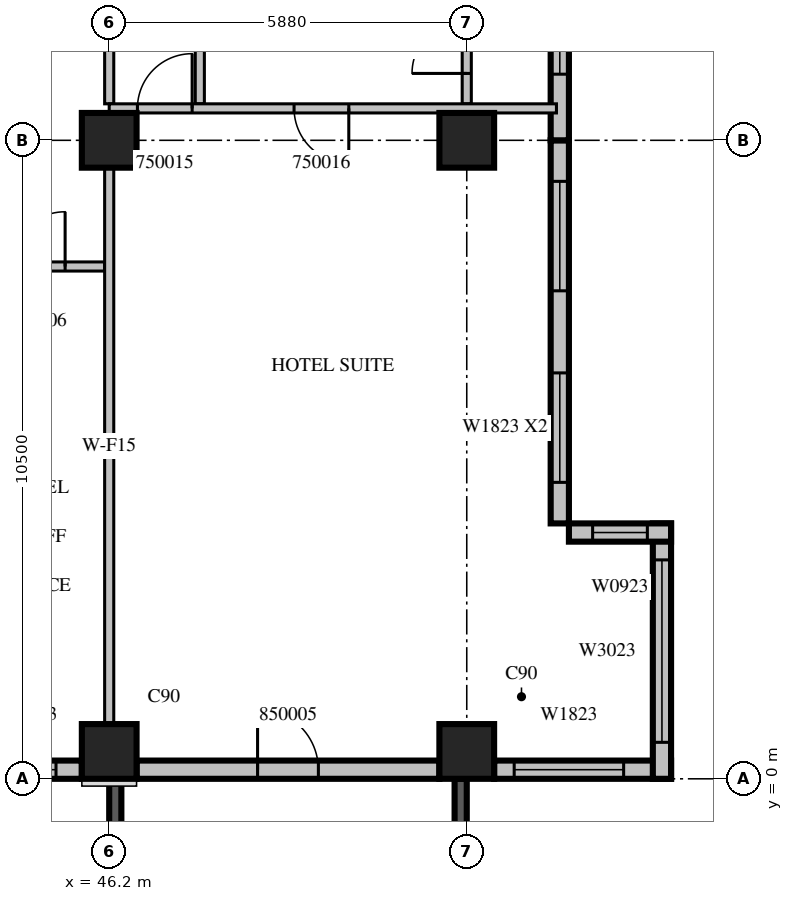
"""IFC4 building model, lengths in metres.
Left out: names, types, materials, properties, quantities, classifications, styles, units other than length and angle.
Written with IfcOpenShell. Run it as: python <this file> out.ifc"""

import sys

from ifc_helpers import new_model, si_unit, direction, frame, frame_2d, origin, origin_2d, place, context, subcontext, project, spatial, rectangle, extrude, source, transform, mapped, element, fill, save


model = new_model("IFC4")
c1 = context("Model", 3, precision=1e-05, world=origin(), true_north=direction((0.0, 1.0)))
c2 = subcontext(c1, "Body", "Model", "MODEL_VIEW")
j1 = project(units=[si_unit("LENGTHUNIT", "METRE"), si_unit("PLANEANGLEUNIT", "RADIAN")], contexts=[c1])
p1 = place(None, origin())
s1 = spatial("IfcSite", under=j1, at=p1, CompositionType="ELEMENT")
p2 = place(p1, origin())
s2 = spatial("IfcBuilding", under=s1, at=p2, CompositionType="ELEMENT")
p3 = place(p2, frame((0.0, 0.0, 223.4)))
s3 = spatial("IfcBuildingStorey", under=s2, at=p3, CompositionType="ELEMENT", Elevation=223.4)
m1 = source(origin(), c2, "Body", "SweptSolid", [
    extrude(rectangle(XDim=0.9, YDim=0.9, at=origin_2d()), origin(), (0.0, 0.0, 1.0), 3.8),
])
for number, where, z_axis, x_axis in (
    (1, (46.2, 0.45, 0.0), (0.0, 0.0, 1.0), (1.0, 0.0, 0.0)),
    (2, (52.08, 0.45, 0.0), (0.0, 0.0, 1.0), (1.0, 0.0, 0.0)),
    (3, (46.2, 10.5, 0.0), (0.0, 0.0, 1.0), (1.0, 0.0, 0.0)),
    (4, (52.08, 10.5, 0.0), (0.0, 0.0, 1.0), (1.0, 0.0, 0.0)),
):
    element("IfcColumn", number, at=place(p3, frame(where, z_axis=z_axis, x_axis=x_axis)), inside=s3, PredefinedType="COLUMN", context=c2, shape_type="MappedRepresentation", body=[
        mapped(m1, transform((0.0, 0.0, 0.0), scale=1.0)),
    ])
m2 = source(origin(), c2, "Body", "SweptSolid", [
    extrude(rectangle(XDim=1.75, YDim=0.3, at=frame_2d((0.875, 0.0))), origin(), (0.0, 0.0, 1.0), 3.4),
])
p4 = place(p3, frame((44.0, 0.15, 0.0), z_axis=(0.0, 0.0, 1.0), x_axis=(1.0, 0.0, 0.0)))
e5 = element("IfcWall", 5, at=p4, inside=s3, PredefinedType="STANDARD", context=c2, shape_type="MappedRepresentation", body=[
    mapped(m2, transform((0.0, 0.0, 0.0), scale=1.0)),
])
m3 = source(origin(), c2, "Body", "SweptSolid", [
    extrude(rectangle(XDim=0.9, YDim=2.3, at=frame_2d((0.45, 1.15))), frame((0.0, 0.16, 0.0), z_axis=(0.0, -1.0, 0.0), x_axis=(1.0, 0.0, 0.0)), (0.0, 0.0, 1.0), 0.32),
])
p5 = place(p4, frame((0.425, 0.0, 0.6)))
e6 = element("IfcOpeningElement", 6, at=p5, cuts=e5, PredefinedType="OPENING", context=c2, shape_type="MappedRepresentation", body=[
    mapped(m3, transform((0.0, 0.0, 0.0), scale=1.0)),
])
m4 = source(origin(), c2, "Body", "SweptSolid", [
    extrude(rectangle(XDim=4.98, YDim=0.3, at=frame_2d((2.49, 0.0))), origin(), (0.0, 0.0, 1.0), 3.4),
])
p6 = place(p3, frame((46.65, 0.15, 0.0), z_axis=(0.0, 0.0, 1.0), x_axis=(1.0, 0.0, 0.0)))
e7 = element("IfcWall", 7, at=p6, inside=s3, PredefinedType="STANDARD", context=c2, shape_type="MappedRepresentation", body=[
    mapped(m4, transform((0.0, 0.0, 0.0), scale=1.0)),
])
m5 = source(origin(), c2, "Body", "SweptSolid", [
    extrude(rectangle(XDim=1.0, YDim=2.1, at=frame_2d((0.5, 1.05))), frame((0.0, 0.16, 0.0), z_axis=(0.0, -1.0, 0.0), x_axis=(1.0, 0.0, 0.0)), (0.0, 0.0, 1.0), 0.32),
])
p7 = place(p6, frame((1.99, 0.0, 0.0)))
e8 = element("IfcOpeningElement", 8, at=p7, cuts=e7, PredefinedType="OPENING", context=c2, shape_type="MappedRepresentation", body=[
    mapped(m5, transform((0.0, 0.0, 0.0), scale=1.0)),
])
m6 = source(origin(), c2, "Body", "SweptSolid", [
    extrude(rectangle(XDim=2.91, YDim=0.3, at=frame_2d((1.455, 0.0))), origin(), (0.0, 0.0, 1.0), 3.4),
])
p8 = place(p3, frame((52.53, 0.15, 0.0), z_axis=(0.0, 0.0, 1.0), x_axis=(1.0, 0.0, 0.0)))
e9 = element("IfcWall", 9, at=p8, inside=s3, PredefinedType="STANDARD", context=c2, shape_type="MappedRepresentation", body=[
    mapped(m6, transform((0.0, 0.0, 0.0), scale=1.0)),
])
m7 = source(origin(), c2, "Body", "SweptSolid", [
    extrude(rectangle(XDim=1.8, YDim=2.3, at=frame_2d((0.9, 1.15))), frame((0.0, 0.16, 0.0), z_axis=(0.0, -1.0, 0.0), x_axis=(1.0, 0.0, 0.0)), (0.0, 0.0, 1.0), 0.32),
])
p9 = place(p8, frame((0.33, 0.0, 0.6)))
e10 = element("IfcOpeningElement", 10, at=p9, cuts=e9, PredefinedType="OPENING", context=c2, shape_type="MappedRepresentation", body=[
    mapped(m7, transform((0.0, 0.0, 0.0), scale=1.0)),
])
m8 = source(origin(), c2, "Body", "SweptSolid", [
    extrude(rectangle(XDim=4.2, YDim=0.3, at=frame_2d((2.1, 0.0))), origin(), (0.0, 0.0, 1.0), 3.4),
])
p10 = place(p3, frame((55.29, 0.0, 0.0), z_axis=(0.0, 0.0, 1.0), x_axis=(0.0, 1.0, 0.0)))
e11 = element("IfcWall", 11, at=p10, inside=s3, PredefinedType="STANDARD", context=c2, shape_type="MappedRepresentation", body=[
    mapped(m8, transform((0.0, 0.0, 0.0), scale=1.0)),
])
m9 = source(origin(), c2, "Body", "SweptSolid", [
    extrude(rectangle(XDim=3.0, YDim=2.3, at=frame_2d((1.5, 1.15))), frame((0.0, 0.16, 0.0), z_axis=(0.0, -1.0, 0.0), x_axis=(1.0, 0.0, 0.0)), (0.0, 0.0, 1.0), 0.32),
])
p11 = place(p10, frame((0.6, 0.0, 0.6)))
e12 = element("IfcOpeningElement", 12, at=p11, cuts=e11, PredefinedType="OPENING", context=c2, shape_type="MappedRepresentation", body=[
    mapped(m9, transform((0.0, 0.0, 0.0), scale=1.0)),
])
m10 = source(origin(), c2, "Body", "SweptSolid", [
    extrude(rectangle(XDim=1.68, YDim=0.3, at=frame_2d((0.84, 0.0))), origin(), (0.0, 0.0, 1.0), 3.4),
])
p12 = place(p3, frame((55.44, 4.05, 0.0), z_axis=(0.0, 0.0, 1.0), x_axis=(-1.0, 0.0, 0.0)))
e13 = element("IfcWall", 13, at=p12, inside=s3, PredefinedType="STANDARD", context=c2, shape_type="MappedRepresentation", body=[
    mapped(m10, transform((0.0, 0.0, 0.0), scale=1.0)),
])
p13 = place(p12, frame((0.39, 0.0, 0.6)))
e14 = element("IfcOpeningElement", 14, at=p13, cuts=e13, PredefinedType="OPENING", context=c2, shape_type="MappedRepresentation", body=[
    mapped(m3, transform((0.0, 0.0, 0.0), scale=1.0)),
])
m11 = source(origin(), c2, "Body", "SweptSolid", [
    extrude(rectangle(XDim=6.3, YDim=0.3, at=frame_2d((3.15, 0.0))), origin(), (0.0, 0.0, 1.0), 3.4),
])
p14 = place(p3, frame((53.61, 4.2, 0.0), z_axis=(0.0, 0.0, 1.0), x_axis=(0.0, 1.0, 0.0)))
e15 = element("IfcWall", 15, at=p14, inside=s3, PredefinedType="STANDARD", context=c2, shape_type="MappedRepresentation", body=[
    mapped(m11, transform((0.0, 0.0, 0.0), scale=1.0)),
])
p15 = place(p14, frame((0.675, 0.0, 0.6)))
e16 = element("IfcOpeningElement", 16, at=p15, cuts=e15, PredefinedType="OPENING", context=c2, shape_type="MappedRepresentation", body=[
    mapped(m7, transform((0.0, 0.0, 0.0), scale=1.0)),
])
p16 = place(p14, frame((3.825, 0.0, 0.6)))
e17 = element("IfcOpeningElement", 17, at=p16, cuts=e15, PredefinedType="OPENING", context=c2, shape_type="MappedRepresentation", body=[
    mapped(m7, transform((0.0, 0.0, 0.0), scale=1.0)),
])
m12 = source(origin(), c2, "Body", "SweptSolid", [
    extrude(rectangle(XDim=6.75, YDim=0.3, at=frame_2d((3.375, 0.0))), origin(), (0.0, 0.0, 1.0), 3.4),
])
p17 = place(p3, frame((53.61, 10.5, 0.0), z_axis=(0.0, 0.0, 1.0), x_axis=(0.0, 1.0, 0.0)))
e18 = element("IfcWall", 18, at=p17, inside=s3, PredefinedType="STANDARD", context=c2, shape_type="MappedRepresentation", body=[
    mapped(m12, transform((0.0, 0.0, 0.0), scale=1.0)),
])
m13 = source(origin(), c2, "Body", "SweptSolid", [
    extrude(rectangle(XDim=1.2, YDim=2.3, at=frame_2d((0.6, 1.15))), frame((0.0, 0.16, 0.0), z_axis=(0.0, -1.0, 0.0), x_axis=(1.0, 0.0, 0.0)), (0.0, 0.0, 1.0), 0.32),
])
p18 = place(p17, frame((1.087, 0.0, 0.6)))
e19 = element("IfcOpeningElement", 19, at=p18, cuts=e18, PredefinedType="OPENING", context=c2, shape_type="MappedRepresentation", body=[
    mapped(m13, transform((0.0, 0.0, 0.0), scale=1.0)),
])
m14 = source(origin(), c2, "Body", "SweptSolid", [
    extrude(rectangle(XDim=3.9, YDim=0.2, at=frame_2d((1.95, 0.0))), origin(), (0.0, 0.0, 1.0), 3.39),
])
p19 = place(p3, frame((46.3, 0.0, 0.0), z_axis=(0.0, 0.0, 1.0), x_axis=(0.0, -1.0, 0.0)))
e20 = element("IfcWall", 20, at=p19, inside=s3, PredefinedType="SOLIDWALL", context=c2, shape_type="MappedRepresentation", body=[
    mapped(m14, transform((0.0, 0.0, 0.0), scale=1.0)),
])
m15 = source(origin(), c2, "Body", "SweptSolid", [
    extrude(rectangle(XDim=2.4, YDim=2.3, at=frame_2d((1.2, 1.15))), frame((0.0, 0.11, 0.0), z_axis=(0.0, -1.0, 0.0), x_axis=(1.0, 0.0, 0.0)), (0.0, 0.0, 1.0), 0.22),
])
p20 = place(p19, frame((0.75, 0.0, 0.6)))
e21 = element("IfcOpeningElement", 21, at=p20, cuts=e20, PredefinedType="OPENING", context=c2, shape_type="MappedRepresentation", body=[
    mapped(m15, transform((0.0, 0.0, 0.0), scale=1.0)),
])
p21 = place(p3, frame((51.98, 0.0, 0.0), z_axis=(0.0, 0.0, 1.0), x_axis=(0.0, -1.0, 0.0)))
e22 = element("IfcWall", 22, at=p21, inside=s3, PredefinedType="SOLIDWALL", context=c2, shape_type="MappedRepresentation", body=[
    mapped(m14, transform((0.0, 0.0, 0.0), scale=1.0)),
])
p22 = place(p21, frame((0.75, 0.0, 0.6)))
e23 = element("IfcOpeningElement", 23, at=p22, cuts=e22, PredefinedType="OPENING", context=c2, shape_type="MappedRepresentation", body=[
    mapped(m15, transform((0.0, 0.0, 0.0), scale=1.0)),
])
m16 = source(origin(), c2, "Body", "SweptSolid", [
    extrude(rectangle(XDim=2.2, YDim=0.15, at=frame_2d((1.1, 0.0))), origin(), (0.0, 0.0, 1.0), 3.4),
])
p23 = place(p3, frame((46.125, 8.425, 0.0), z_axis=(0.0, 0.0, 1.0), x_axis=(-1.0, 0.0, 0.0)))
e24 = element("IfcWall", 24, at=p23, inside=s3, PredefinedType="PARTITIONING", context=c2, shape_type="MappedRepresentation", body=[
    mapped(m16, transform((0.0, 0.0, 0.0), scale=1.0)),
])
m17 = source(origin(), c2, "Body", "SweptSolid", [
    extrude(rectangle(XDim=0.9, YDim=2.1, at=frame_2d((0.45, 1.05))), frame((0.0, 0.085, 0.0), z_axis=(0.0, -1.0, 0.0), x_axis=(1.0, 0.0, 0.0)), (0.0, 0.0, 1.0), 0.17),
])
p24 = place(p23, frame((0.65, 0.0, 0.0)))
e25 = element("IfcOpeningElement", 25, at=p24, cuts=e24, PredefinedType="OPENING", context=c2, shape_type="MappedRepresentation", body=[
    mapped(m17, transform((0.0, 0.0, 0.0), scale=1.0)),
])
m18 = source(origin(), c2, "Body", "SweptSolid", [
    extrude(rectangle(XDim=3.9, YDim=0.15, at=frame_2d((1.95, 0.0))), origin(), (0.0, 0.0, 1.0), 3.4),
])
p25 = place(p3, frame((47.69, 11.1, 0.0), z_axis=(0.0, 0.0, 1.0), x_axis=(0.0, 1.0, 0.0)))
e26 = element("IfcWall", 26, at=p25, inside=s3, PredefinedType="PARTITIONING", context=c2, shape_type="MappedRepresentation", body=[
    mapped(m18, transform((0.0, 0.0, 0.0), scale=1.0)),
])
p26 = place(p3, frame((52.08, 11.1, 0.0), z_axis=(0.0, 0.0, 1.0), x_axis=(0.0, 1.0, 0.0)))
e27 = element("IfcWall", 27, at=p26, inside=s3, PredefinedType="PARTITIONING", context=c2, shape_type="MappedRepresentation", body=[
    mapped(m18, transform((0.0, 0.0, 0.0), scale=1.0)),
])
p27 = place(p26, frame((1.5, 0.0, 0.0)))
e28 = element("IfcOpeningElement", 28, at=p27, cuts=e27, PredefinedType="OPENING", context=c2, shape_type="MappedRepresentation", body=[
    mapped(m17, transform((0.0, 0.0, 0.0), scale=1.0)),
])
p28 = place(p26, frame((2.5, 0.0, 0.0)))
e29 = element("IfcOpeningElement", 29, at=p28, cuts=e27, PredefinedType="OPENING", context=c2, shape_type="MappedRepresentation", body=[
    mapped(m17, transform((0.0, 0.0, 0.0), scale=1.0)),
])
p29 = place(p26, frame((0.5, 0.0, 0.0)))
e30 = element("IfcOpeningElement", 30, at=p29, cuts=e27, PredefinedType="OPENING", context=c2, shape_type="MappedRepresentation", body=[
    mapped(m17, transform((0.0, 0.0, 0.0), scale=1.0)),
])
m19 = source(origin(), c2, "Body", "SweptSolid", [
    extrude(rectangle(XDim=9.152, YDim=0.15, at=frame_2d((4.576, 0.0))), origin(), (0.0, 0.0, 1.0), 3.4),
])
p30 = place(p3, frame((46.2, 0.899, 0.0), z_axis=(0.0, 0.0, 1.0), x_axis=(0.0, 1.0, 0.0)))
e31 = element("IfcWall", 31, at=p30, inside=s3, PredefinedType="PARTITIONING", context=c2, shape_type="MappedRepresentation", body=[
    mapped(m19, transform((0.0, 0.0, 0.0), scale=1.0)),
])
p31 = place(p3, frame((46.2, 11.1, 0.0), z_axis=(0.0, 0.0, 1.0), x_axis=(0.0, 1.0, 0.0)))
e32 = element("IfcWall", 32, at=p31, inside=s3, PredefinedType="PARTITIONING", context=c2, shape_type="MappedRepresentation", body=[
    mapped(m18, transform((0.0, 0.0, 0.0), scale=1.0)),
])
m20 = source(origin(), c2, "Body", "SweptSolid", [
    extrude(rectangle(XDim=7.355, YDim=0.15, at=frame_2d((3.678, 0.0))), origin(), (0.0, 0.0, 1.0), 3.4),
])
p32 = place(p3, frame((53.555, 11.025, 0.0), z_axis=(0.0, 0.0, 1.0), x_axis=(-1.0, 0.0, 0.0)))
e33 = element("IfcWall", 33, at=p32, inside=s3, PredefinedType="PARTITIONING", context=c2, shape_type="MappedRepresentation", body=[
    mapped(m20, transform((0.0, 0.0, 0.0), scale=1.0)),
])
p33 = place(p32, frame((5.991, 0.0, 0.0)))
e34 = element("IfcOpeningElement", 34, at=p33, cuts=e33, PredefinedType="OPENING", context=c2, shape_type="MappedRepresentation", body=[
    mapped(m17, transform((0.0, 0.0, 0.0), scale=1.0)),
])
p34 = place(p32, frame((3.415, 0.0, 0.0)))
e35 = element("IfcOpeningElement", 35, at=p34, cuts=e33, PredefinedType="OPENING", context=c2, shape_type="MappedRepresentation", body=[
    mapped(m17, transform((0.0, 0.0, 0.0), scale=1.0)),
])
m21 = source(origin(), c2, "Body", "SweptSolid", [
    extrude(rectangle(XDim=0.9, YDim=2.3, at=frame_2d((0.45, 1.15))), frame((0.0, 0.03, 0.0), z_axis=(0.0, -1.0, 0.0), x_axis=(1.0, 0.0, 0.0)), (0.0, 0.0, 1.0), 0.06),
])
p35 = place(p5, origin())
e36 = element("IfcWindow", 36, at=p35, inside=s3, PartitioningType="SINGLE_PANEL", PredefinedType="WINDOW", context=c2, shape_type="MappedRepresentation", body=[
    mapped(m21, transform((0.0, 0.0, 0.0), scale=1.0)),
])
fill(e6, e36)
m22 = source(origin(), c2, "Body", "SweptSolid", [
    extrude(rectangle(XDim=1.8, YDim=2.3, at=frame_2d((0.9, 1.15))), frame((0.0, 0.03, 0.0), z_axis=(0.0, -1.0, 0.0), x_axis=(1.0, 0.0, 0.0)), (0.0, 0.0, 1.0), 0.06),
])
p36 = place(p9, origin())
e37 = element("IfcWindow", 37, at=p36, inside=s3, PartitioningType="SINGLE_PANEL", PredefinedType="WINDOW", context=c2, shape_type="MappedRepresentation", body=[
    mapped(m22, transform((0.0, 0.0, 0.0), scale=1.0)),
])
fill(e10, e37)
m23 = source(origin(), c2, "Body", "SweptSolid", [
    extrude(rectangle(XDim=3.0, YDim=2.3, at=frame_2d((1.5, 1.15))), frame((0.0, 0.03, 0.0), z_axis=(0.0, -1.0, 0.0), x_axis=(1.0, 0.0, 0.0)), (0.0, 0.0, 1.0), 0.06),
])
p37 = place(p11, origin())
e38 = element("IfcWindow", 38, at=p37, inside=s3, PartitioningType="SINGLE_PANEL", PredefinedType="WINDOW", context=c2, shape_type="MappedRepresentation", body=[
    mapped(m23, transform((0.0, 0.0, 0.0), scale=1.0)),
])
fill(e12, e38)
p38 = place(p13, origin())
e39 = element("IfcWindow", 39, at=p38, inside=s3, PartitioningType="SINGLE_PANEL", PredefinedType="WINDOW", context=c2, shape_type="MappedRepresentation", body=[
    mapped(m21, transform((0.0, 0.0, 0.0), scale=1.0)),
])
fill(e14, e39)
p39 = place(p15, origin())
e40 = element("IfcWindow", 40, at=p39, inside=s3, PartitioningType="SINGLE_PANEL", PredefinedType="WINDOW", context=c2, shape_type="MappedRepresentation", body=[
    mapped(m22, transform((0.0, 0.0, 0.0), scale=1.0)),
])
fill(e16, e40)
p40 = place(p16, origin())
e41 = element("IfcWindow", 41, at=p40, inside=s3, PartitioningType="SINGLE_PANEL", PredefinedType="WINDOW", context=c2, shape_type="MappedRepresentation", body=[
    mapped(m22, transform((0.0, 0.0, 0.0), scale=1.0)),
])
fill(e17, e41)
m24 = source(origin(), c2, "Body", "SweptSolid", [
    extrude(rectangle(XDim=1.2, YDim=2.3, at=frame_2d((0.6, 1.15))), frame((0.0, 0.03, 0.0), z_axis=(0.0, -1.0, 0.0), x_axis=(1.0, 0.0, 0.0)), (0.0, 0.0, 1.0), 0.06),
])
p41 = place(p18, origin())
e42 = element("IfcWindow", 42, at=p41, inside=s3, PartitioningType="SINGLE_PANEL", PredefinedType="WINDOW", context=c2, shape_type="MappedRepresentation", body=[
    mapped(m24, transform((0.0, 0.0, 0.0), scale=1.0)),
])
fill(e19, e42)
m25 = source(origin(), c2, "Body", "SweptSolid", [
    extrude(rectangle(XDim=0.9, YDim=2.1, at=frame_2d((0.45, 1.05))), frame((0.0, 0.025, 0.0), z_axis=(0.0, -1.0, 0.0), x_axis=(1.0, 0.0, 0.0)), (0.0, 0.0, 1.0), 0.05),
])
p42 = place(p24, origin())
e43 = element("IfcDoor", 43, at=p42, inside=s3, OperationType="SINGLE_SWING_RIGHT", PredefinedType="DOOR", context=c2, shape_type="MappedRepresentation", body=[
    mapped(m25, transform((0.0, 0.0, 0.0), scale=1.0)),
])
fill(e25, e43)
p43 = place(p33, origin())
e44 = element("IfcDoor", 44, at=p43, inside=s3, OperationType="SINGLE_SWING_RIGHT", PredefinedType="DOOR", context=c2, shape_type="MappedRepresentation", body=[
    mapped(m25, transform((0.0, 0.0, 0.0), scale=1.0)),
])
fill(e34, e44)
p44 = place(p34, origin())
e45 = element("IfcDoor", 45, at=p44, inside=s3, OperationType="SINGLE_SWING_LEFT", PredefinedType="DOOR", context=c2, shape_type="MappedRepresentation", body=[
    mapped(m25, transform((0.0, 0.0, 0.0), scale=1.0)),
])
fill(e35, e45)
p45 = place(p29, origin())
e46 = element("IfcDoor", 46, at=p45, inside=s3, OperationType="SINGLE_SWING_LEFT", PredefinedType="DOOR", context=c2, shape_type="MappedRepresentation", body=[
    mapped(m25, transform((0.0, 0.0, 0.0), scale=1.0)),
])
fill(e30, e46)
m26 = source(origin(), c2, "Body", "SweptSolid", [
    extrude(rectangle(XDim=1.0, YDim=2.1, at=frame_2d((0.5, 1.05))), frame((0.0, 0.025, 0.0), z_axis=(0.0, -1.0, 0.0), x_axis=(1.0, 0.0, 0.0)), (0.0, 0.0, 1.0), 0.05),
])
p46 = place(p7, origin())
e47 = element("IfcDoor", 47, at=p46, inside=s3, OperationType="SINGLE_SWING_LEFT", PredefinedType="DOOR", context=c2, shape_type="MappedRepresentation", body=[
    mapped(m26, transform((0.0, 0.0, 0.0), scale=1.0)),
])
fill(e8, e47)
save(model, sys.argv[1])
